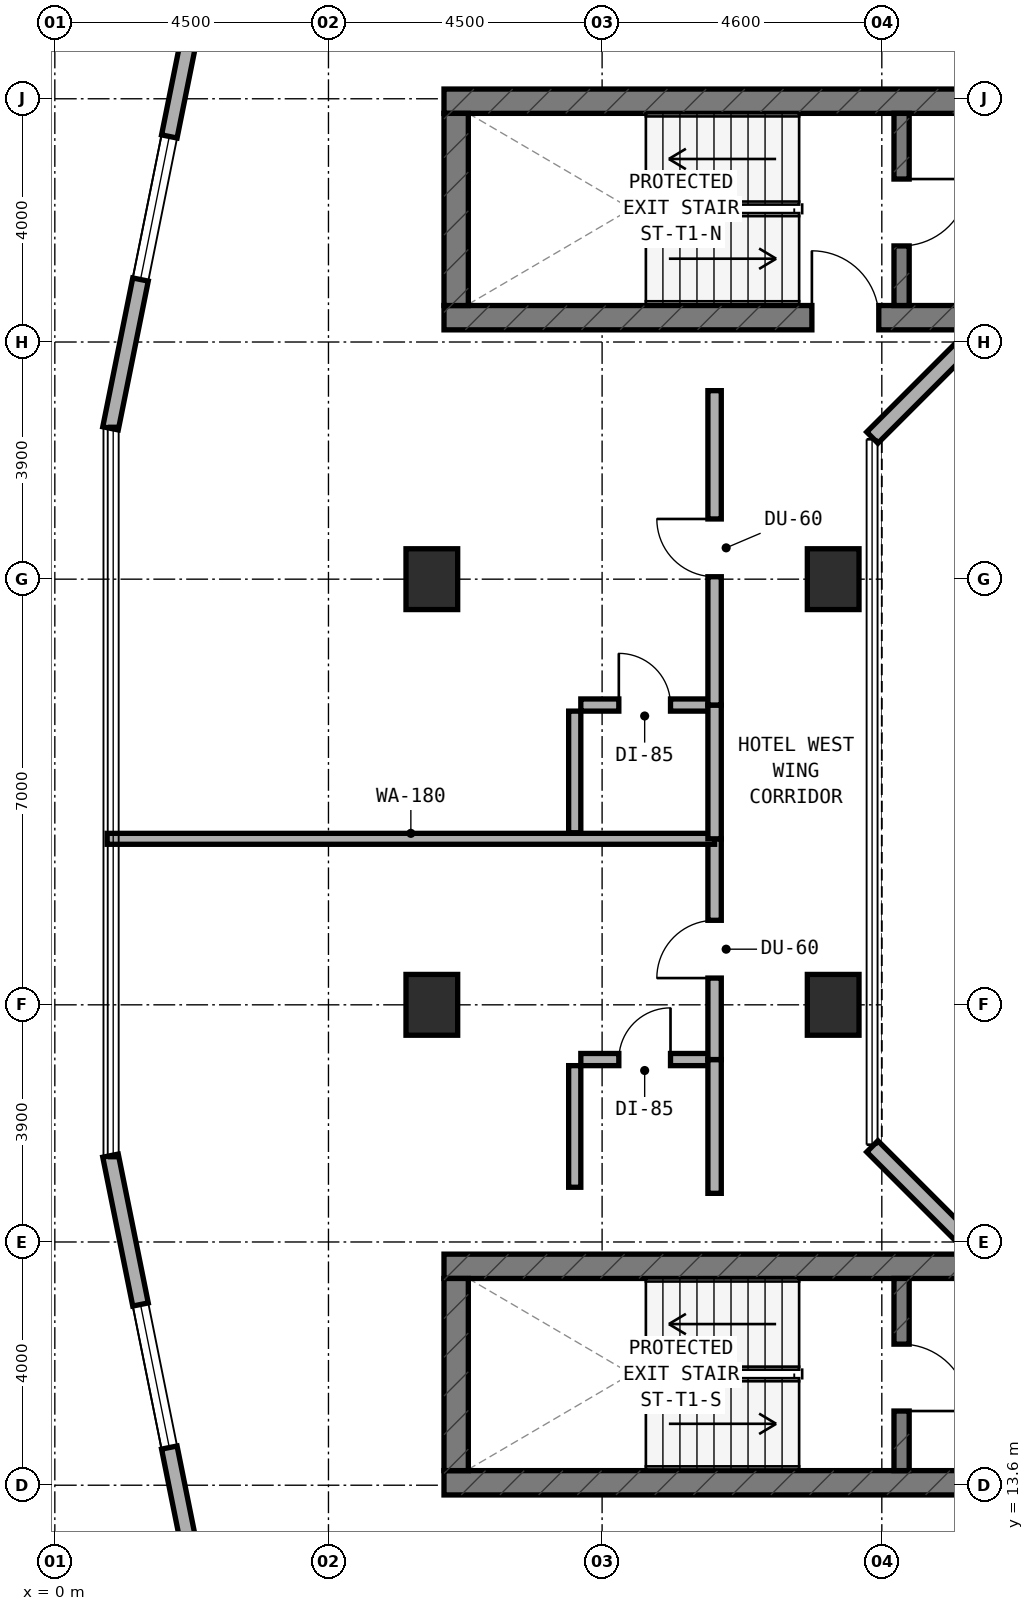
"""IFC4 building model, lengths in metres.
Left out: names, types, materials, properties, quantities, classifications, styles, units other than length and angle.
Written with IfcOpenShell. Run it as: python <this file> out.ifc"""

import sys

from ifc_helpers import new_model, si_unit, direction, frame, frame_2d, origin, origin_2d, place, context, subcontext, project, spatial, rectangle, extrude, element, fill, save


model = new_model("IFC4")
c1 = context("Model", 3, precision=1e-05, world=origin(), true_north=direction((0.0, 1.0)))
c2 = subcontext(c1, "Body", "Model", "MODEL_VIEW")
j1 = project(units=[si_unit("LENGTHUNIT", "METRE"), si_unit("PLANEANGLEUNIT", "RADIAN")], contexts=[c1])
p1 = place(None, origin())
s1 = spatial("IfcSite", under=j1, at=p1, CompositionType="ELEMENT")
p2 = place(p1, origin())
s2 = spatial("IfcBuilding", under=s1, at=p2, CompositionType="ELEMENT")
p3 = place(p2, frame((0.0, 0.0, 112.5)))
s3 = spatial("IfcBuildingStorey", under=s2, at=p3, CompositionType="ELEMENT", Elevation=112.5)
p4 = place(p3, frame((6.4, 32.8, 0.0), z_axis=(0.0, 0.0, 1.0), x_axis=(1.0, 0.0, 0.0)))
e1 = element("IfcWall", 1, at=p4, inside=s3, PredefinedType="SHEAR", context=c2, shape_type="SweptSolid", body=[
    extrude(rectangle(XDim=24.4, YDim=0.4, at=frame_2d((12.2, 0.0))), origin(), (0.0, 0.0, 1.0), 3.5),
])
p5 = place(p4, frame((6.05, 0.0, 0.0)))
e2 = element("IfcOpeningElement", 2, at=p5, cuts=e1, PredefinedType="OPENING", context=c2, shape_type="SweptSolid", body=[
    extrude(rectangle(XDim=1.1, YDim=2.15, at=frame_2d((0.55, 1.075))), frame((0.0, 0.21, 0.0), z_axis=(0.0, -1.0, 0.0), x_axis=(1.0, 0.0, 0.0)), (0.0, 0.0, 1.0), 0.42),
])
p6 = place(p3, frame((6.4, 36.36, 0.0), z_axis=(0.0, 0.0, 1.0), x_axis=(1.0, 0.0, 0.0)))
e3 = element("IfcWall", 3, at=p6, inside=s3, PredefinedType="SHEAR", context=c2, shape_type="SweptSolid", body=[
    extrude(rectangle(XDim=24.4, YDim=0.4, at=frame_2d((12.2, 0.0))), origin(), (0.0, 0.0, 1.0), 3.5),
])
p7 = place(p6, frame((9.15, 0.0, 0.0)))
e4 = element("IfcOpeningElement", 4, at=p7, cuts=e3, PredefinedType="OPENING", context=c2, shape_type="SweptSolid", body=[
    extrude(rectangle(XDim=1.2, YDim=2.15, at=frame_2d((0.6, 1.075))), frame((0.0, 0.21, 0.0), z_axis=(0.0, -1.0, 0.0), x_axis=(1.0, 0.0, 0.0)), (0.0, 0.0, 1.0), 0.42),
])
p8 = place(p6, frame((17.22, 0.0, 0.0)))
e5 = element("IfcOpeningElement", 5, at=p8, cuts=e3, PredefinedType="OPENING", context=c2, shape_type="SweptSolid", body=[
    extrude(rectangle(XDim=0.85, YDim=2.1, at=frame_2d((0.425, 1.05))), frame((0.0, 0.21, 0.0), z_axis=(0.0, -1.0, 0.0), x_axis=(1.0, 0.0, 0.0)), (0.0, 0.0, 1.0), 0.42),
])
p9 = place(p6, frame((18.783, 0.0, 0.0)))
e6 = element("IfcOpeningElement", 6, at=p9, cuts=e3, PredefinedType="OPENING", context=c2, shape_type="SweptSolid", body=[
    extrude(rectangle(XDim=1.1, YDim=2.15, at=frame_2d((0.55, 1.075))), frame((0.0, 0.21, 0.0), z_axis=(0.0, -1.0, 0.0), x_axis=(1.0, 0.0, 0.0)), (0.0, 0.0, 1.0), 0.42),
])
p10 = place(p6, frame((20.65, 0.0, 0.0)))
e7 = element("IfcOpeningElement", 7, at=p10, cuts=e3, PredefinedType="OPENING", context=c2, shape_type="SweptSolid", body=[
    extrude(rectangle(XDim=1.1, YDim=2.15, at=frame_2d((0.55, 1.075))), frame((0.0, 0.21, 0.0), z_axis=(0.0, -1.0, 0.0), x_axis=(1.0, 0.0, 0.0)), (0.0, 0.0, 1.0), 0.42),
])
p11 = place(p6, frame((22.517, 0.0, 0.0)))
e8 = element("IfcOpeningElement", 8, at=p11, cuts=e3, PredefinedType="OPENING", context=c2, shape_type="SweptSolid", body=[
    extrude(rectangle(XDim=1.1, YDim=2.15, at=frame_2d((0.55, 1.075))), frame((0.0, 0.21, 0.0), z_axis=(0.0, -1.0, 0.0), x_axis=(1.0, 0.0, 0.0)), (0.0, 0.0, 1.0), 0.42),
])
p12 = place(p3, frame((6.6, 33.0, 0.0), z_axis=(0.0, 0.0, 1.0), x_axis=(0.0, 1.0, 0.0)))
e9 = element("IfcWall", 9, at=p12, inside=s3, PredefinedType="SHEAR", context=c2, shape_type="SweptSolid", body=[
    extrude(rectangle(XDim=3.16, YDim=0.4, at=frame_2d((1.58, 0.0))), origin(), (0.0, 0.0, 1.0), 3.5),
])
p13 = place(p3, frame((13.925, 33.0, 0.0), z_axis=(0.0, 0.0, 1.0), x_axis=(0.0, 1.0, 0.0)))
e10 = element("IfcWall", 10, at=p13, inside=s3, PredefinedType="STANDARD", context=c2, shape_type="SweptSolid", body=[
    extrude(rectangle(XDim=3.16, YDim=0.25, at=frame_2d((1.58, 0.0))), origin(), (0.0, 0.0, 1.0), 3.22),
])
p14 = place(p13, frame((0.98, 0.0, 0.0)))
e11 = element("IfcOpeningElement", 11, at=p14, cuts=e10, PredefinedType="OPENING", context=c2, shape_type="SweptSolid", body=[
    extrude(rectangle(XDim=1.1, YDim=2.15, at=frame_2d((0.55, 1.075))), frame((0.0, 0.135, 0.0), z_axis=(0.0, -1.0, 0.0), x_axis=(1.0, 0.0, 0.0)), (0.0, 0.0, 1.0), 0.27),
])
p15 = place(p3, frame((6.4, 13.64, 0.0), z_axis=(0.0, 0.0, 1.0), x_axis=(1.0, 0.0, 0.0)))
e12 = element("IfcWall", 12, at=p15, inside=s3, PredefinedType="SHEAR", context=c2, shape_type="SweptSolid", body=[
    extrude(rectangle(XDim=24.4, YDim=0.4, at=frame_2d((12.2, 0.0))), origin(), (0.0, 0.0, 1.0), 3.5),
])
p16 = place(p15, frame((9.15, 0.0, 0.0)))
e13 = element("IfcOpeningElement", 13, at=p16, cuts=e12, PredefinedType="OPENING", context=c2, shape_type="SweptSolid", body=[
    extrude(rectangle(XDim=1.2, YDim=2.15, at=frame_2d((0.6, 1.075))), frame((0.0, 0.21, 0.0), z_axis=(0.0, -1.0, 0.0), x_axis=(1.0, 0.0, 0.0)), (0.0, 0.0, 1.0), 0.42),
])
p17 = place(p15, frame((17.22, 0.0, 0.0)))
e14 = element("IfcOpeningElement", 14, at=p17, cuts=e12, PredefinedType="OPENING", context=c2, shape_type="SweptSolid", body=[
    extrude(rectangle(XDim=0.85, YDim=2.1, at=frame_2d((0.425, 1.05))), frame((0.0, 0.21, 0.0), z_axis=(0.0, -1.0, 0.0), x_axis=(1.0, 0.0, 0.0)), (0.0, 0.0, 1.0), 0.42),
])
p18 = place(p3, frame((6.4, 17.2, 0.0), z_axis=(0.0, 0.0, 1.0), x_axis=(1.0, 0.0, 0.0)))
e15 = element("IfcWall", 15, at=p18, inside=s3, PredefinedType="SHEAR", context=c2, shape_type="SweptSolid", body=[
    extrude(rectangle(XDim=24.4, YDim=0.4, at=frame_2d((12.2, 0.0))), origin(), (0.0, 0.0, 1.0), 3.5),
])
p19 = place(p3, frame((6.6, 13.84, 0.0), z_axis=(0.0, 0.0, 1.0), x_axis=(0.0, 1.0, 0.0)))
e16 = element("IfcWall", 16, at=p19, inside=s3, PredefinedType="SHEAR", context=c2, shape_type="SweptSolid", body=[
    extrude(rectangle(XDim=3.16, YDim=0.4, at=frame_2d((1.58, 0.0))), origin(), (0.0, 0.0, 1.0), 3.5),
])
p20 = place(p3, frame((13.925, 13.84, 0.0), z_axis=(0.0, 0.0, 1.0), x_axis=(0.0, 1.0, 0.0)))
e17 = element("IfcWall", 17, at=p20, inside=s3, PredefinedType="STANDARD", context=c2, shape_type="SweptSolid", body=[
    extrude(rectangle(XDim=3.16, YDim=0.25, at=frame_2d((1.58, 0.0))), origin(), (0.0, 0.0, 1.0), 3.22),
])
p21 = place(p20, frame((0.98, 0.0, 0.0)))
e18 = element("IfcOpeningElement", 18, at=p21, cuts=e17, PredefinedType="OPENING", context=c2, shape_type="SweptSolid", body=[
    extrude(rectangle(XDim=1.1, YDim=2.15, at=frame_2d((0.55, 1.075))), frame((0.0, 0.135, 0.0), z_axis=(0.0, -1.0, 0.0), x_axis=(1.0, 0.0, 0.0)), (0.0, 0.0, 1.0), 0.27),
])
for number, where, z_axis, x_axis in (
    (19, (6.2, 21.5, 0.0), (0.0, 0.0, 1.0), (1.0, 0.0, 0.0)),
    (20, (6.2, 28.5, 0.0), (0.0, 0.0, 1.0), (1.0, 0.0, 0.0)),
    (21, (12.8, 21.5, 0.0), (0.0, 0.0, 1.0), (1.0, 0.0, 0.0)),
    (22, (12.8, 28.5, 0.0), (0.0, 0.0, 1.0), (1.0, 0.0, 0.0)),
):
    element("IfcColumn", number, at=place(p3, frame(where, z_axis=z_axis, x_axis=x_axis)), inside=s3, PredefinedType="COLUMN", context=c2, shape_type="SweptSolid", body=[
        extrude(rectangle(XDim=0.85, YDim=1.0, at=origin_2d()), origin(), (0.0, 0.0, 1.0), 3.5),
    ])
p22 = place(p3, frame((2.729, 39.982, 0.0), z_axis=(0.0, 0.0, 1.0), x_axis=(-0.197435082048, -0.980315963543, 0.0)))
e23 = element("IfcWall", 23, at=p22, inside=s3, PredefinedType="STANDARD", context=c2, shape_type="SweptSolid", body=[
    extrude(rectangle(XDim=9.183, YDim=0.26, at=frame_2d((4.591, 0.0))), origin(), (0.0, 0.0, 1.0), 3.22),
])
p23 = place(p22, frame((4.286, 0.0, 0.8)))
e24 = element("IfcOpeningElement", 24, at=p23, cuts=e23, PredefinedType="OPENING", context=c2, shape_type="SweptSolid", body=[
    extrude(rectangle(XDim=2.4, YDim=1.6, at=frame_2d((1.2, 0.8))), frame((0.0, 0.14, 0.0), z_axis=(0.0, -1.0, 0.0), x_axis=(1.0, 0.0, 0.0)), (0.0, 0.0, 1.0), 0.28),
])
p24 = place(p3, frame((0.916, 19.02, 0.0), z_axis=(0.0, 0.0, 1.0), x_axis=(0.197435082048, -0.980315963543, 0.0)))
e25 = element("IfcWall", 25, at=p24, inside=s3, PredefinedType="STANDARD", context=c2, shape_type="SweptSolid", body=[
    extrude(rectangle(XDim=9.183, YDim=0.26, at=frame_2d((4.591, 0.0))), origin(), (0.0, 0.0, 1.0), 3.22),
])
p25 = place(p24, frame((2.497, 0.0, 0.8)))
e26 = element("IfcOpeningElement", 26, at=p25, cuts=e25, PredefinedType="OPENING", context=c2, shape_type="SweptSolid", body=[
    extrude(rectangle(XDim=2.4, YDim=1.6, at=frame_2d((1.2, 0.8))), frame((0.0, 0.14, 0.0), z_axis=(0.0, -1.0, 0.0), x_axis=(1.0, 0.0, 0.0)), (0.0, 0.0, 1.0), 0.28),
])
for number, where, z_axis, x_axis in (
    (27, (15.278, 32.662, 0.0), (0.0, 0.0, 1.0), (-0.707, -0.707, 0.0)),
    (28, (13.444, 19.172, 0.0), (0.0, 0.0, 1.0), (0.707, -0.707, 0.0)),
):
    element("IfcWall", number, at=place(p3, frame(where, z_axis=z_axis, x_axis=x_axis)), inside=s3, PredefinedType="STANDARD", context=c2, shape_type="SweptSolid", body=[
        extrude(rectangle(XDim=2.594, YDim=0.26, at=frame_2d((1.297, 0.0))), origin(), (0.0, 0.0, 1.0), 3.22),
    ])
p26 = place(p3, frame((8.65, 20.6, 0.0), z_axis=(0.0, 0.0, 1.0), x_axis=(1.0, 0.0, 0.0)))
e29 = element("IfcWall", 29, at=p26, inside=s3, PredefinedType="PLUMBINGWALL", context=c2, shape_type="SweptSolid", body=[
    extrude(rectangle(XDim=2.1, YDim=0.2, at=frame_2d((1.05, 0.0))), origin(), (0.0, 0.0, 1.0), 3.22),
])
p27 = place(p26, frame((0.625, 0.0, 0.0)))
e30 = element("IfcOpeningElement", 30, at=p27, cuts=e29, PredefinedType="OPENING", context=c2, shape_type="SweptSolid", body=[
    extrude(rectangle(XDim=0.85, YDim=2.1, at=frame_2d((0.425, 1.05))), frame((0.0, 0.11, 0.0), z_axis=(0.0, -1.0, 0.0), x_axis=(1.0, 0.0, 0.0)), (0.0, 0.0, 1.0), 0.22),
])
p28 = place(p3, frame((8.55, 18.5, 0.0), z_axis=(0.0, 0.0, 1.0), x_axis=(0.0, 1.0, 0.0)))
e31 = element("IfcWall", 31, at=p28, inside=s3, PredefinedType="PLUMBINGWALL", context=c2, shape_type="SweptSolid", body=[
    extrude(rectangle(XDim=2.0, YDim=0.2, at=frame_2d((1.0, 0.0))), origin(), (0.0, 0.0, 1.0), 3.22),
])
p29 = place(p3, frame((10.85, 18.4, 0.0), z_axis=(0.0, 0.0, 1.0), x_axis=(0.0, 1.0, 0.0)))
e32 = element("IfcWall", 32, at=p29, inside=s3, PredefinedType="SOLIDWALL", context=c2, shape_type="SweptSolid", body=[
    extrude(rectangle(XDim=2.2, YDim=0.22, at=frame_2d((1.1, 0.0))), origin(), (0.0, 0.0, 1.0), 3.22),
])
p30 = place(p3, frame((10.85, 20.6, 0.0), z_axis=(0.0, 0.0, 1.0), x_axis=(0.0, 1.0, 0.0)))
e33 = element("IfcWall", 33, at=p30, inside=s3, PredefinedType="SOLIDWALL", context=c2, shape_type="SweptSolid", body=[
    extrude(rectangle(XDim=3.63, YDim=0.22, at=frame_2d((1.815, 0.0))), origin(), (0.0, 0.0, 1.0), 2.695),
])
p31 = place(p30, frame((1.34, 0.0, 0.0)))
e34 = element("IfcOpeningElement", 34, at=p31, cuts=e33, PredefinedType="OPENING", context=c2, shape_type="SweptSolid", body=[
    extrude(rectangle(XDim=0.95, YDim=2.1, at=frame_2d((0.475, 1.05))), frame((0.0, 0.12, 0.0), z_axis=(0.0, -1.0, 0.0), x_axis=(1.0, 0.0, 0.0)), (0.0, 0.0, 1.0), 0.24),
])
p32 = place(p3, frame((0.86, 24.23, 0.0), z_axis=(0.0, 0.0, 1.0), x_axis=(1.0, 0.0, 0.0)))
e35 = element("IfcWall", 35, at=p32, inside=s3, PredefinedType="SOLIDWALL", context=c2, shape_type="SweptSolid", body=[
    extrude(rectangle(XDim=9.99, YDim=0.18, at=frame_2d((4.995, 0.0))), origin(), (0.0, 0.0, 1.0), 2.835),
])
p33 = place(p3, frame((8.65, 26.43, 0.0), z_axis=(0.0, 0.0, 1.0), x_axis=(1.0, 0.0, 0.0)))
e36 = element("IfcWall", 36, at=p33, inside=s3, PredefinedType="PLUMBINGWALL", context=c2, shape_type="SweptSolid", body=[
    extrude(rectangle(XDim=2.1, YDim=0.2, at=frame_2d((1.05, 0.0))), origin(), (0.0, 0.0, 1.0), 3.22),
])
p34 = place(p33, frame((0.625, 0.0, 0.0)))
e37 = element("IfcOpeningElement", 37, at=p34, cuts=e36, PredefinedType="OPENING", context=c2, shape_type="SweptSolid", body=[
    extrude(rectangle(XDim=0.85, YDim=2.1, at=frame_2d((0.425, 1.05))), frame((0.0, 0.11, 0.0), z_axis=(0.0, -1.0, 0.0), x_axis=(1.0, 0.0, 0.0)), (0.0, 0.0, 1.0), 0.22),
])
p35 = place(p3, frame((8.55, 24.33, 0.0), z_axis=(0.0, 0.0, 1.0), x_axis=(0.0, 1.0, 0.0)))
e38 = element("IfcWall", 38, at=p35, inside=s3, PredefinedType="PLUMBINGWALL", context=c2, shape_type="SweptSolid", body=[
    extrude(rectangle(XDim=2.0, YDim=0.2, at=frame_2d((1.0, 0.0))), origin(), (0.0, 0.0, 1.0), 3.22),
])
p36 = place(p3, frame((10.85, 24.23, 0.0), z_axis=(0.0, 0.0, 1.0), x_axis=(0.0, 1.0, 0.0)))
e39 = element("IfcWall", 39, at=p36, inside=s3, PredefinedType="SOLIDWALL", context=c2, shape_type="SweptSolid", body=[
    extrude(rectangle(XDim=2.2, YDim=0.22, at=frame_2d((1.1, 0.0))), origin(), (0.0, 0.0, 1.0), 3.22),
])
p37 = place(p3, frame((10.85, 26.43, 0.0), z_axis=(0.0, 0.0, 1.0), x_axis=(0.0, 1.0, 0.0)))
e40 = element("IfcWall", 40, at=p37, inside=s3, PredefinedType="SOLIDWALL", context=c2, shape_type="SweptSolid", body=[
    extrude(rectangle(XDim=5.17, YDim=0.22, at=frame_2d((2.585, 0.0))), origin(), (0.0, 0.0, 1.0), 2.695),
])
p38 = place(p37, frame((2.11, 0.0, 0.0)))
e41 = element("IfcOpeningElement", 41, at=p38, cuts=e40, PredefinedType="OPENING", context=c2, shape_type="SweptSolid", body=[
    extrude(rectangle(XDim=0.95, YDim=2.1, at=frame_2d((0.475, 1.05))), frame((0.0, 0.12, 0.0), z_axis=(0.0, -1.0, 0.0), x_axis=(1.0, 0.0, 0.0)), (0.0, 0.0, 1.0), 0.24),
])
p39 = place(p23, origin())
e42 = element("IfcWindow", 42, at=p39, inside=s3, PartitioningType="SINGLE_PANEL", PredefinedType="WINDOW", context=c2, shape_type="SweptSolid", body=[
    extrude(rectangle(XDim=2.4, YDim=1.6, at=frame_2d((1.2, 0.8))), frame((0.0, 0.03, 0.0), z_axis=(0.0, -1.0, 0.0), x_axis=(1.0, 0.0, 0.0)), (0.0, 0.0, 1.0), 0.06),
])
fill(e24, e42)
p40 = place(p25, origin())
e43 = element("IfcWindow", 43, at=p40, inside=s3, PartitioningType="SINGLE_PANEL", PredefinedType="WINDOW", context=c2, shape_type="SweptSolid", body=[
    extrude(rectangle(XDim=2.4, YDim=1.6, at=frame_2d((1.2, 0.8))), frame((0.0, 0.03, 0.0), z_axis=(0.0, -1.0, 0.0), x_axis=(1.0, 0.0, 0.0)), (0.0, 0.0, 1.0), 0.06),
])
fill(e26, e43)
p41 = place(p14, frame((1.1, 0.0, 0.0), z_axis=(0.0, 0.0, 1.0), x_axis=(-1.0, 0.0, 0.0)))
e44 = element("IfcDoor", 44, at=p41, inside=s3, OperationType="SINGLE_SWING_LEFT", PredefinedType="DOOR", context=c2, shape_type="SweptSolid", body=[
    extrude(rectangle(XDim=1.1, YDim=2.15, at=frame_2d((0.55, 1.075))), frame((0.0, 0.025, 0.0), z_axis=(0.0, -1.0, 0.0), x_axis=(1.0, 0.0, 0.0)), (0.0, 0.0, 1.0), 0.05),
])
fill(e11, e44)
p42 = place(p21, frame((1.1, 0.0, 0.0), z_axis=(0.0, 0.0, 1.0), x_axis=(-1.0, 0.0, 0.0)))
e45 = element("IfcDoor", 45, at=p42, inside=s3, OperationType="SINGLE_SWING_RIGHT", PredefinedType="DOOR", context=c2, shape_type="SweptSolid", body=[
    extrude(rectangle(XDim=1.1, YDim=2.15, at=frame_2d((0.55, 1.075))), frame((0.0, 0.025, 0.0), z_axis=(0.0, -1.0, 0.0), x_axis=(1.0, 0.0, 0.0)), (0.0, 0.0, 1.0), 0.05),
])
fill(e18, e45)
p43 = place(p5, origin())
e46 = element("IfcDoor", 46, at=p43, inside=s3, OperationType="SINGLE_SWING_LEFT", PredefinedType="DOOR", context=c2, shape_type="SweptSolid", body=[
    extrude(rectangle(XDim=1.1, YDim=2.15, at=frame_2d((0.55, 1.075))), frame((0.0, 0.025, 0.0), z_axis=(0.0, -1.0, 0.0), x_axis=(1.0, 0.0, 0.0)), (0.0, 0.0, 1.0), 0.05),
])
fill(e2, e46)
p44 = place(p27, origin())
e47 = element("IfcDoor", 47, at=p44, inside=s3, OperationType="SINGLE_SWING_RIGHT", PredefinedType="DOOR", context=c2, shape_type="SweptSolid", body=[
    extrude(rectangle(XDim=0.85, YDim=2.1, at=frame_2d((0.425, 1.05))), frame((0.0, 0.025, 0.0), z_axis=(0.0, -1.0, 0.0), x_axis=(1.0, 0.0, 0.0)), (0.0, 0.0, 1.0), 0.05),
])
fill(e30, e47)
p45 = place(p31, origin())
e48 = element("IfcDoor", 48, at=p45, inside=s3, OperationType="SINGLE_SWING_LEFT", PredefinedType="DOOR", context=c2, shape_type="SweptSolid", body=[
    extrude(rectangle(XDim=0.95, YDim=2.1, at=frame_2d((0.475, 1.05))), frame((0.0, 0.025, 0.0), z_axis=(0.0, -1.0, 0.0), x_axis=(1.0, 0.0, 0.0)), (0.0, 0.0, 1.0), 0.05),
])
fill(e34, e48)
p46 = place(p34, origin())
e49 = element("IfcDoor", 49, at=p46, inside=s3, OperationType="SINGLE_SWING_LEFT", PredefinedType="DOOR", context=c2, shape_type="SweptSolid", body=[
    extrude(rectangle(XDim=0.85, YDim=2.1, at=frame_2d((0.425, 1.05))), frame((0.0, 0.025, 0.0), z_axis=(0.0, -1.0, 0.0), x_axis=(1.0, 0.0, 0.0)), (0.0, 0.0, 1.0), 0.05),
])
fill(e37, e49)
p47 = place(p38, origin())
e50 = element("IfcDoor", 50, at=p47, inside=s3, OperationType="SINGLE_SWING_RIGHT", PredefinedType="DOOR", context=c2, shape_type="SweptSolid", body=[
    extrude(rectangle(XDim=0.95, YDim=2.1, at=frame_2d((0.475, 1.05))), frame((0.0, 0.025, 0.0), z_axis=(0.0, -1.0, 0.0), x_axis=(1.0, 0.0, 0.0)), (0.0, 0.0, 1.0), 0.05),
])
fill(e41, e50)
save(model, sys.argv[1])
